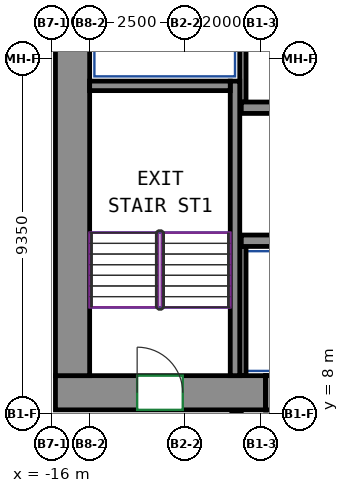
"""IFC4 building model, lengths in metres.
Left out: names, types, materials, properties, quantities, classifications, styles, units other than length and angle.
Written with IfcOpenShell. Run it as: python <this file> out.ifc"""

import sys

from ifc_helpers import new_model, si_unit, direction, frame, frame_2d, origin, place, context, subcontext, project, spatial, rectangle, extrude, source, transform, mapped, element, fill, save


model = new_model("IFC4")
c1 = context("Model", 3, precision=1e-05, world=origin(), true_north=direction((0.0, 1.0)))
c2 = subcontext(c1, "Body", "Model", "MODEL_VIEW")
j1 = project(units=[si_unit("LENGTHUNIT", "METRE"), si_unit("PLANEANGLEUNIT", "RADIAN")], contexts=[c1])
p1 = place(None, origin())
s1 = spatial("IfcSite", under=j1, at=p1, CompositionType="ELEMENT")
p2 = place(p1, origin())
s2 = spatial("IfcBuilding", under=s1, at=p2, CompositionType="ELEMENT")
p3 = place(p2, frame((0.0, 0.0, 138.5)))
s3 = spatial("IfcBuildingStorey", under=s2, at=p3, CompositionType="ELEMENT", Elevation=138.5)
m1 = source(origin(), c2, "Body", "SweptSolid", [
    extrude(rectangle(XDim=5.53, YDim=0.9, at=frame_2d((2.765, 0.0))), origin(), (0.0, 0.0, 1.0), 5.12),
])
p4 = place(p3, frame((-15.9, 8.55, 0.0), z_axis=(0.0, 0.0, 1.0), x_axis=(1.0, 0.0, 0.0)))
e1 = element("IfcWall", 1, at=p4, inside=s3, PredefinedType="SHEAR", context=c2, shape_type="MappedRepresentation", body=[
    mapped(m1, transform((0.0, 0.0, 0.0))),
])
p5 = place(p4, frame((2.15, 0.0, 0.0)))
e2 = element("IfcOpeningElement", 2, at=p5, cuts=e1, PredefinedType="OPENING", context=c2, shape_type="SweptSolid", body=[
    extrude(rectangle(XDim=1.2, YDim=2.1, at=frame_2d((0.6, 1.05))), frame((0.0, 0.46, 0.0), z_axis=(0.0, -1.0, 0.0), x_axis=(1.0, 0.0, 0.0)), (0.0, 0.0, 1.0), 0.92),
])
m2 = source(origin(), c2, "Body", "SweptSolid", [
    extrude(rectangle(XDim=12.0, YDim=0.9, at=frame_2d((6.0, 0.0))), origin(), (0.0, 0.0, 1.0), 5.12),
])
p6 = place(p3, frame((-15.45, 9.0, 0.0), z_axis=(0.0, 0.0, 1.0), x_axis=(0.0, 1.0, 0.0)))
e3 = element("IfcWall", 3, at=p6, inside=s3, PredefinedType="SHEAR", context=c2, shape_type="MappedRepresentation", body=[
    mapped(m2, transform((0.0, 0.0, 0.0))),
])
m3 = source(origin(), c2, "Body", "SweptSolid", [
    extrude(rectangle(XDim=7.75, YDim=0.25, at=frame_2d((3.875, 0.0))), origin(), (0.0, 0.0, 1.0), 5.12),
])
p7 = place(p3, frame((-11.175, 9.0, 0.0), z_axis=(0.0, 0.0, 1.0), x_axis=(0.0, 1.0, 0.0)))
e4 = element("IfcWall", 4, at=p7, inside=s3, PredefinedType="SHEAR", context=c2, shape_type="MappedRepresentation", body=[
    mapped(m3, transform((0.0, 0.0, 0.0))),
])
m4 = source(origin(), c2, "Body", "SweptSolid", [
    extrude(rectangle(XDim=3.7, YDim=0.25, at=frame_2d((1.85, 0.0))), origin(), (0.0, 0.0, 1.0), 5.12),
])
p8 = place(p3, frame((-15.0, 16.625, 0.0), z_axis=(0.0, 0.0, 1.0), x_axis=(1.0, 0.0, 0.0)))
e5 = element("IfcWall", 5, at=p8, inside=s3, PredefinedType="SHEAR", context=c2, shape_type="MappedRepresentation", body=[
    mapped(m4, transform((0.0, 0.0, 0.0))),
])
m5 = source(origin(), c2, "Body", "SweptSolid", [
    extrude(rectangle(XDim=6.0, YDim=0.3, at=frame_2d((3.0, 0.0))), origin(), (0.0, 0.0, 1.0), 5.12),
])
for number, where, z_axis, x_axis in (
    (6, (-11.01, 12.55, 0.0), (0.0, 0.0, 1.0), (1.0, 0.0, 0.0)),
    (7, (-11.01, 16.05, 0.0), (0.0, 0.0, 1.0), (1.0, 0.0, 0.0)),
):
    element("IfcWall", number, at=place(p3, frame(where, z_axis=z_axis, x_axis=x_axis)), inside=s3, PredefinedType="SHEAR", context=c2, shape_type="MappedRepresentation", body=[
        mapped(m5, transform((0.0, 0.0, 0.0))),
    ])
m6 = source(origin(), c2, "Body", "SweptSolid", [
    extrude(rectangle(XDim=1.4, YDim=0.9, at=frame_2d((0.7, 0.0))), origin(), (0.0, 0.0, 1.0), 1.22),
])
p9 = place(p3, frame((-10.37, 8.55, 3.9), z_axis=(0.0, 0.0, 1.0), x_axis=(1.0, 0.0, 0.0)))
e8 = element("IfcWall", 8, at=p9, inside=s3, PredefinedType="SHEAR", context=c2, shape_type="MappedRepresentation", body=[
    mapped(m6, transform((0.0, 0.0, 0.0))),
])
m7 = source(origin(), c2, "Body", "SweptSolid", [
    extrude(rectangle(XDim=4.8, YDim=0.165, at=frame_2d((2.4, 0.0))), origin(), (0.0, 0.0, 1.0), 5.12),
])
p10 = place(p3, frame((-10.968, 16.2, 0.0), z_axis=(0.0, 0.0, 1.0), x_axis=(0.0, 1.0, 0.0)))
e9 = element("IfcWall", 9, at=p10, inside=s3, PredefinedType="PARTITIONING", context=c2, shape_type="MappedRepresentation", body=[
    mapped(m7, transform((0.0, 0.0, 0.0))),
])
m8 = source(origin(), c2, "Body", "SweptSolid", [
    extrude(rectangle(XDim=3.4, YDim=0.165, at=frame_2d((1.7, 0.0))), origin(), (0.0, 0.0, 1.0), 5.12),
])
p11 = place(p3, frame((-10.968, 9.0, 0.0), z_axis=(0.0, 0.0, 1.0), x_axis=(0.0, 1.0, 0.0)))
e10 = element("IfcWall", 10, at=p11, inside=s3, PredefinedType="PARTITIONING", context=c2, shape_type="MappedRepresentation", body=[
    mapped(m8, transform((0.0, 0.0, 0.0))),
])
m9 = source(origin(), c2, "Body", "SweptSolid", [
    extrude(rectangle(XDim=1.4, YDim=0.9, at=frame_2d((0.7, 0.0))), origin(), (0.0, 0.0, 1.0), 2.7),
])
p12 = place(p3, frame((-10.37, 8.55, 0.0), z_axis=(0.0, 0.0, 1.0), x_axis=(1.0, 0.0, 0.0)))
e11 = element("IfcWall", 11, at=p12, inside=s3, PredefinedType="PARTITIONING", context=c2, shape_type="MappedRepresentation", body=[
    mapped(m9, transform((0.0, 0.0, 0.0))),
])
p13 = place(p12, frame((0.25, 0.0, 0.0)))
e12 = element("IfcOpeningElement", 12, at=p13, cuts=e11, PredefinedType="OPENING", context=c2, shape_type="SweptSolid", body=[
    extrude(rectangle(XDim=0.9, YDim=2.1, at=frame_2d((0.45, 1.05))), frame((0.0, 0.46, 0.0), z_axis=(0.0, -1.0, 0.0), x_axis=(1.0, 0.0, 0.0)), (0.0, 0.0, 1.0), 0.92),
])
p14 = place(p5, origin())
e13 = element("IfcDoor", 13, at=p14, inside=s3, OperationType="DOUBLE_DOOR_SINGLE_SWING", PredefinedType="DOOR", context=c2, shape_type="SweptSolid", body=[
    extrude(rectangle(XDim=1.2, YDim=2.1, at=frame_2d((0.6, 1.05))), frame((0.0, 0.355, 0.0), z_axis=(0.0, -1.0, 0.0), x_axis=(1.0, 0.0, 0.0)), (0.0, 0.0, 1.0), 0.05),
])
fill(e2, e13)
save(model, sys.argv[1])
